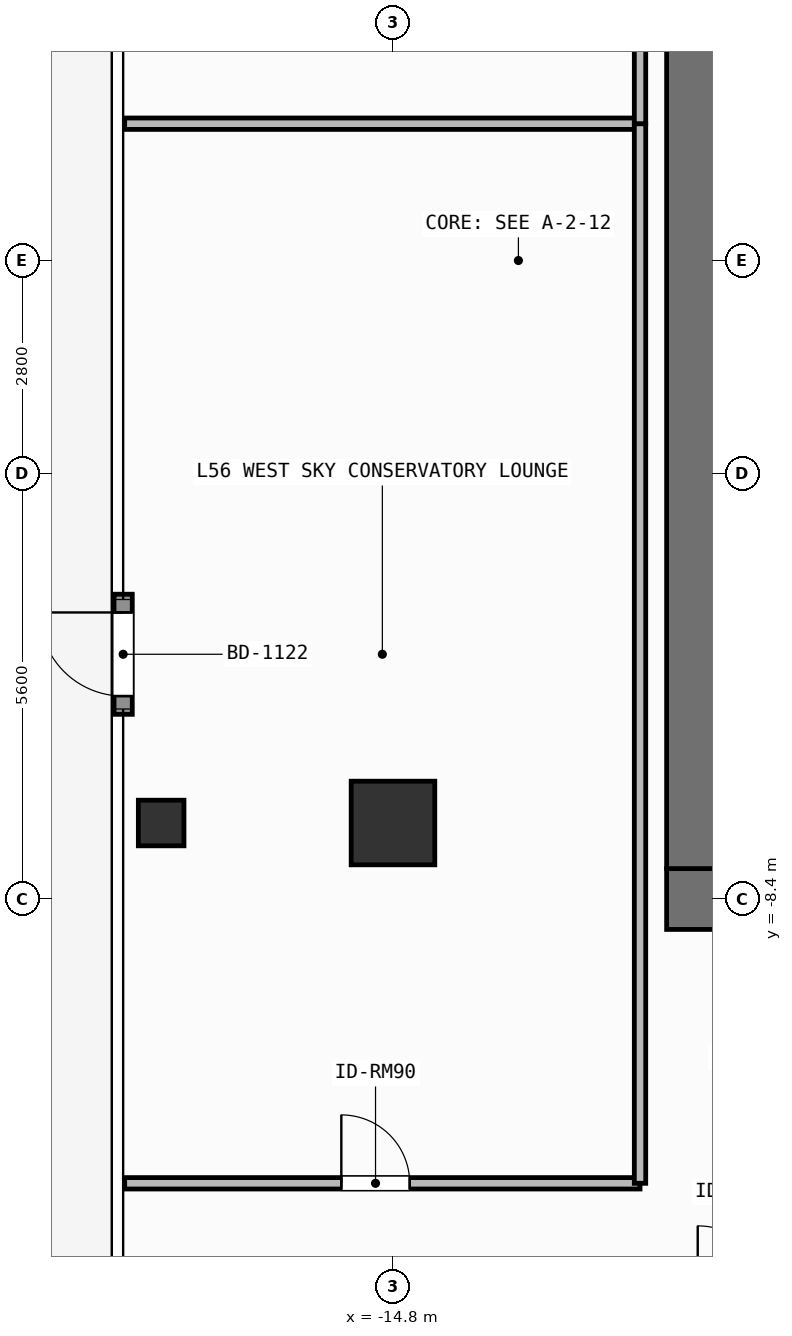
"""IFC4 building model, lengths in metres.
Left out: names, types, materials, properties, quantities, classifications, styles, units other than length and angle.
Written with IfcOpenShell. Run it as: python <this file> out.ifc"""

import sys

from ifc_helpers import new_model, si_unit, direction, frame, frame_2d, origin, origin_2d, place, context, subcontext, project, spatial, rectangle, hollow_rectangle, extrude, element, fill, save


model = new_model("IFC4")
c1 = context("Model", 3, precision=1e-05, world=origin(), true_north=direction((0.0, 1.0)))
c2 = subcontext(c1, "Body", "Model", "MODEL_VIEW")
j1 = project(units=[si_unit("LENGTHUNIT", "METRE"), si_unit("PLANEANGLEUNIT", "RADIAN")], contexts=[c1])
p1 = place(None, origin())
s1 = spatial("IfcSite", under=j1, at=p1, CompositionType="ELEMENT")
p2 = place(p1, origin())
s2 = spatial("IfcBuilding", under=s1, at=p2, CompositionType="ELEMENT")
p3 = place(p2, frame((0.0, 0.0, 227.4)))
s3 = spatial("IfcBuildingStorey", under=s2, at=p3, CompositionType="ELEMENT", Elevation=227.4)
p4 = place(p3, frame((-11.2, -8.4, 0.0), z_axis=(0.0, 0.0, 1.0), x_axis=(1.0, 0.0, 0.0)))
e1 = element("IfcWall", 1, at=p4, inside=s3, PredefinedType="SHEAR", context=c2, shape_type="SweptSolid", body=[
    extrude(rectangle(XDim=1.5, YDim=0.8, at=frame_2d((0.75, 0.0))), origin(), (0.0, 0.0, 1.0), 3.9),
])
p5 = place(p3, frame((-10.8, -8.0, 0.0), z_axis=(0.0, 0.0, 1.0), x_axis=(0.0, 1.0, 0.0)))
e2 = element("IfcWall", 2, at=p5, inside=s3, PredefinedType="SHEAR", context=c2, shape_type="SweptSolid", body=[
    extrude(rectangle(XDim=16.0, YDim=0.8, at=frame_2d((8.0, 0.0))), origin(), (0.0, 0.0, 1.0), 3.9),
])
p6 = place(p3, frame((-14.8, -7.4, 0.0), z_axis=(0.0, 0.0, 1.0), x_axis=(1.0, 0.0, 0.0)))
e3 = element("IfcColumn", 3, at=p6, inside=s3, PredefinedType="COLUMN", context=c2, shape_type="SweptSolid", body=[
    extrude(rectangle(XDim=1.1, YDim=1.1, at=origin_2d()), origin(), (0.0, 0.0, 1.0), 3.9),
])
p7 = place(p3, frame((-17.85, -7.4, 0.0), z_axis=(0.0, 0.0, 1.0), x_axis=(1.0, 0.0, 0.0)))
e4 = element("IfcColumn", 4, at=p7, inside=s3, PredefinedType="COLUMN", context=c2, shape_type="SweptSolid", body=[
    extrude(hollow_rectangle(XDim=0.6, YDim=0.6, WallThickness=0.028, at=origin_2d()), origin(), (0.0, 0.0, 1.0), 3.9),
])
p8 = place(p3, frame((-18.35, -5.97, 0.0), z_axis=(0.0, 0.0, 1.0), x_axis=(0.0, 1.0, 0.0)))
e5 = element("IfcWall", 5, at=p8, inside=s3, PredefinedType="SOLIDWALL", context=c2, shape_type="SweptSolid", body=[
    extrude(rectangle(XDim=1.58, YDim=0.24, at=frame_2d((0.79, 0.0))), origin(), (0.0, 0.0, 1.0), 3.68),
])
p9 = place(p8, frame((0.24, 0.0, 0.0)))
e6 = element("IfcOpeningElement", 6, at=p9, cuts=e5, PredefinedType="OPENING", context=c2, shape_type="SweptSolid", body=[
    extrude(rectangle(XDim=1.1, YDim=2.2, at=frame_2d((0.55, 1.1))), frame((0.0, 0.13, 0.0), z_axis=(0.0, -1.0, 0.0), x_axis=(1.0, 0.0, 0.0)), (0.0, 0.0, 1.0), 0.26),
])
p10 = place(p3, frame((-18.33, -12.14, 0.0), z_axis=(0.0, 0.0, 1.0), x_axis=(1.0, 0.0, 0.0)))
e7 = element("IfcWall", 7, at=p10, inside=s3, PredefinedType="PARTITIONING", context=c2, shape_type="SweptSolid", body=[
    extrude(rectangle(XDim=6.78, YDim=0.15, at=frame_2d((3.39, 0.0))), origin(), (0.0, 0.0, 1.0), 3.68),
])
p11 = place(p10, frame((2.85, 0.0, 0.0)))
e8 = element("IfcOpeningElement", 8, at=p11, cuts=e7, PredefinedType="OPENING", context=c2, shape_type="SweptSolid", body=[
    extrude(rectangle(XDim=0.9, YDim=2.1, at=frame_2d((0.45, 1.05))), frame((0.0, 0.085, 0.0), z_axis=(0.0, -1.0, 0.0), x_axis=(1.0, 0.0, 0.0)), (0.0, 0.0, 1.0), 0.17),
])
p12 = place(p3, frame((-18.33, 1.8, 0.0), z_axis=(0.0, 0.0, 1.0), x_axis=(1.0, 0.0, 0.0)))
e9 = element("IfcWall", 9, at=p12, inside=s3, PredefinedType="PARTITIONING", context=c2, shape_type="SweptSolid", body=[
    extrude(rectangle(XDim=6.78, YDim=0.15, at=frame_2d((3.39, 0.0))), origin(), (0.0, 0.0, 1.0), 3.68),
])
p13 = place(p3, frame((-11.55, -12.14, 0.0), z_axis=(0.0, 0.0, 1.0), x_axis=(0.0, 1.0, 0.0)))
e10 = element("IfcWall", 10, at=p13, inside=s3, PredefinedType="PARTITIONING", context=c2, shape_type="SweptSolid", body=[
    extrude(rectangle(XDim=13.94, YDim=0.15, at=frame_2d((6.97, 0.0))), origin(), (0.0, 0.0, 1.0), 3.68),
])
p14 = place(p3, frame((-11.55, 1.8, 0.0), z_axis=(0.0, 0.0, 1.0), x_axis=(0.0, 1.0, 0.0)))
e11 = element("IfcWall", 11, at=p14, inside=s3, PredefinedType="PARTITIONING", context=c2, shape_type="SweptSolid", body=[
    extrude(rectangle(XDim=10.34, YDim=0.15, at=frame_2d((5.17, 0.0))), origin(), (0.0, 0.0, 1.0), 3.68),
])
p15 = place(p9, origin())
e12 = element("IfcDoor", 12, at=p15, inside=s3, OperationType="SINGLE_SWING_RIGHT", PredefinedType="DOOR", context=c2, shape_type="SweptSolid", body=[
    extrude(rectangle(XDim=1.1, YDim=2.2, at=frame_2d((0.55, 1.1))), frame((0.0, 0.025, 0.0), z_axis=(0.0, -1.0, 0.0), x_axis=(1.0, 0.0, 0.0)), (0.0, 0.0, 1.0), 0.05),
])
fill(e6, e12)
p16 = place(p11, origin())
e13 = element("IfcDoor", 13, at=p16, inside=s3, OperationType="SINGLE_SWING_LEFT", PredefinedType="DOOR", context=c2, shape_type="SweptSolid", body=[
    extrude(rectangle(XDim=0.9, YDim=2.1, at=frame_2d((0.45, 1.05))), frame((0.0, 0.025, 0.0), z_axis=(0.0, -1.0, 0.0), x_axis=(1.0, 0.0, 0.0)), (0.0, 0.0, 1.0), 0.05),
])
fill(e8, e13)
save(model, sys.argv[1])
